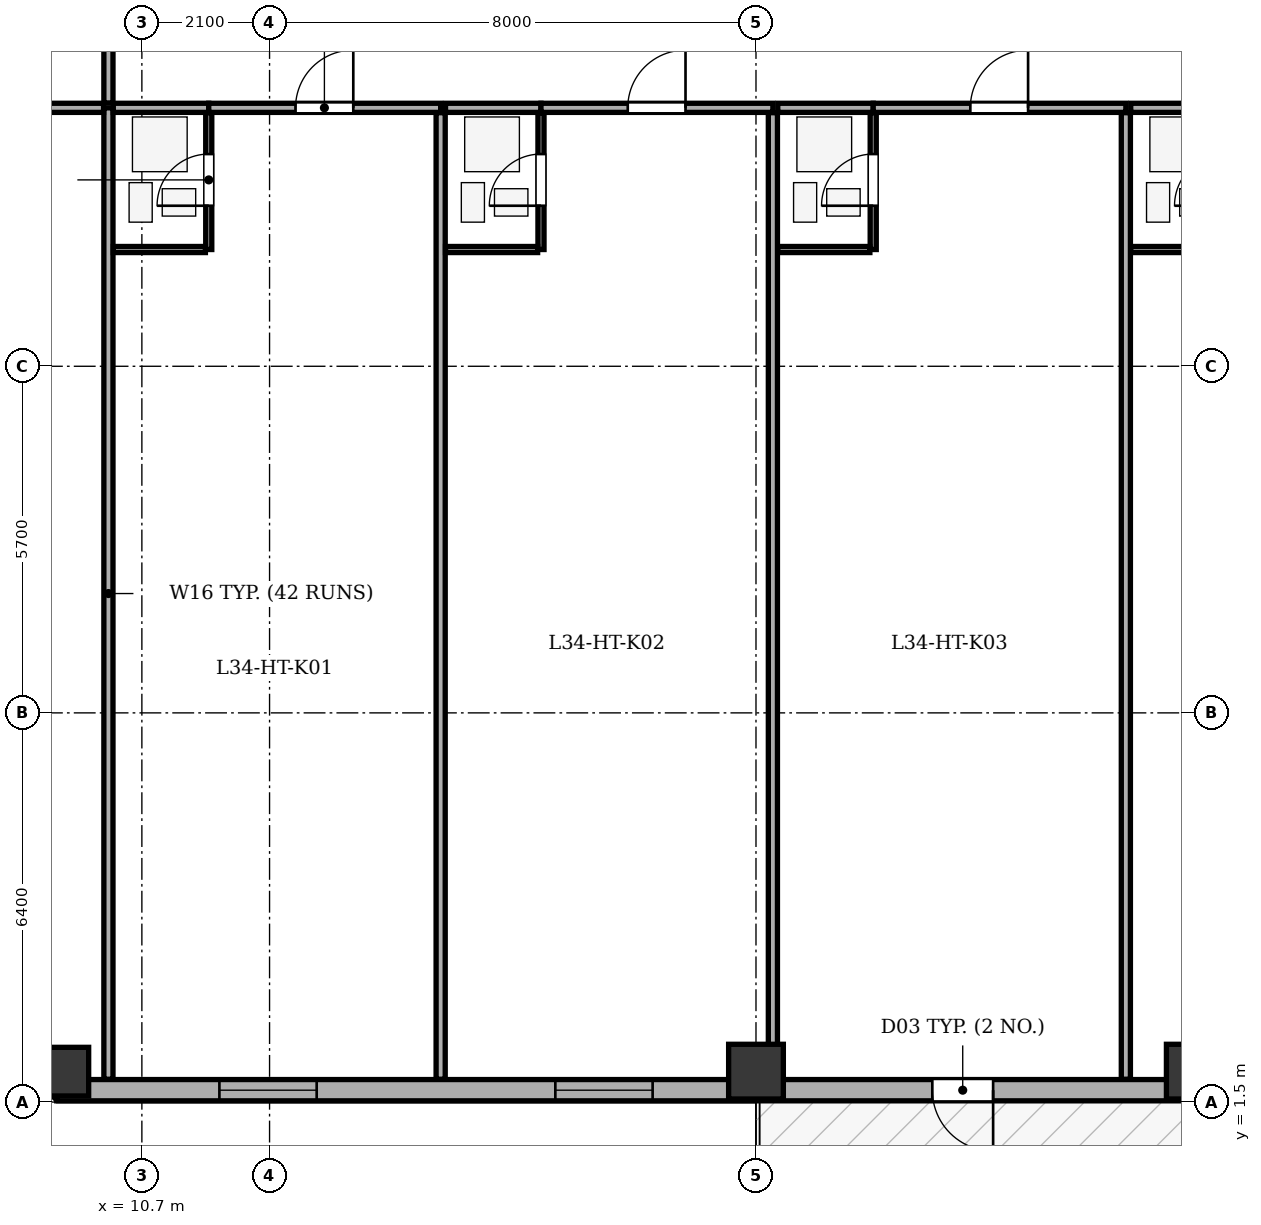
"""IFC4 building model, lengths in metres.
Left out: names, types, materials, properties, quantities, classifications, styles, units other than length and angle.
Written with IfcOpenShell. Run it as: python <this file> out.ifc"""

import sys

from ifc_helpers import new_model, si_unit, direction, frame, frame_2d, origin, origin_2d, place, context, subcontext, project, spatial, rectangle, extrude, element, fill, save


model = new_model("IFC4")
c1 = context("Model", 3, precision=1e-05, world=origin(), true_north=direction((0.0, 1.0)))
c2 = subcontext(c1, "Body", "Model", "MODEL_VIEW")
j1 = project(units=[si_unit("LENGTHUNIT", "METRE"), si_unit("PLANEANGLEUNIT", "RADIAN")], contexts=[c1])
p1 = place(None, origin())
s1 = spatial("IfcSite", under=j1, at=p1, CompositionType="ELEMENT")
p2 = place(p1, origin())
s2 = spatial("IfcBuilding", under=s1, at=p2, CompositionType="ELEMENT")
p3 = place(p2, frame((0.0, 0.0, 137.8)))
s3 = spatial("IfcBuildingStorey", under=s2, at=p3, CompositionType="ELEMENT", Elevation=137.8)
p4 = place(p3, frame((9.3, 2.0, 0.0), z_axis=(0.0, 0.0, 1.0), x_axis=(1.0, 0.0, 0.0)))
e1 = element("IfcColumn", 1, at=p4, inside=s3, PredefinedType="COLUMN", context=c2, shape_type="SweptSolid", body=[
    extrude(rectangle(XDim=0.8, YDim=1.05, at=origin_2d()), origin(), (0.0, 0.0, 1.0), 3.5),
])
for number, where, z_axis, x_axis in (
    (2, (20.8, 2.0, 0.0), (0.0, 0.0, 1.0), (1.0, 0.0, 0.0)),
    (3, (28.0, 2.0, 0.0), (0.0, 0.0, 1.0), (1.0, 0.0, 0.0)),
):
    element("IfcColumn", number, at=place(p3, frame(where, z_axis=z_axis, x_axis=x_axis)), inside=s3, PredefinedType="COLUMN", context=c2, shape_type="SweptSolid", body=[
        extrude(rectangle(XDim=0.9, YDim=0.9, at=origin_2d()), origin(), (0.0, 0.0, 1.0), 3.5),
    ])
p5 = place(p3, frame((44.3, 1.695, 0.0), z_axis=(0.0, 0.0, 1.0), x_axis=(-1.0, 0.0, 0.0)))
e4 = element("IfcWall", 4, at=p5, inside=s3, PredefinedType="STANDARD", context=c2, shape_type="SweptSolid", body=[
    extrude(rectangle(XDim=35.0, YDim=0.35, at=frame_2d((17.5, 0.0))), origin(), (0.0, 0.0, 1.0), 2.435),
])
p6 = place(p5, frame((19.6, 0.0, 0.0)))
e5 = element("IfcOpeningElement", 5, at=p6, cuts=e4, PredefinedType="OPENING", context=c2, shape_type="SweptSolid", body=[
    extrude(rectangle(XDim=1.0, YDim=2.02, at=frame_2d((0.5, 1.01))), frame((0.0, 0.185, 0.0), z_axis=(0.0, -1.0, 0.0), x_axis=(1.0, 0.0, 0.0)), (0.0, 0.0, 1.0), 0.37),
])
p7 = place(p5, frame((2.24, 0.0, 0.75)))
e6 = element("IfcOpeningElement", 6, at=p7, cuts=e4, PredefinedType="OPENING", context=c2, shape_type="SweptSolid", body=[
    extrude(rectangle(XDim=1.6, YDim=1.565, at=frame_2d((0.8, 0.782))), frame((0.0, 0.185, 0.0), z_axis=(0.0, -1.0, 0.0), x_axis=(1.0, 0.0, 0.0)), (0.0, 0.0, 1.0), 0.37),
])
p8 = place(p5, frame((6.678, 0.0, 0.75)))
e7 = element("IfcOpeningElement", 7, at=p8, cuts=e4, PredefinedType="OPENING", context=c2, shape_type="SweptSolid", body=[
    extrude(rectangle(XDim=1.35, YDim=1.565, at=frame_2d((0.675, 0.782))), frame((0.0, 0.185, 0.0), z_axis=(0.0, -1.0, 0.0), x_axis=(1.0, 0.0, 0.0)), (0.0, 0.0, 1.0), 0.37),
])
p9 = place(p5, frame((13.055, 0.0, 0.75)))
e8 = element("IfcOpeningElement", 8, at=p9, cuts=e4, PredefinedType="OPENING", context=c2, shape_type="SweptSolid", body=[
    extrude(rectangle(XDim=1.6, YDim=1.565, at=frame_2d((0.8, 0.782))), frame((0.0, 0.185, 0.0), z_axis=(0.0, -1.0, 0.0), x_axis=(1.0, 0.0, 0.0)), (0.0, 0.0, 1.0), 0.37),
])
p10 = place(p5, frame((25.2, 0.0, 0.75)))
e9 = element("IfcOpeningElement", 9, at=p10, cuts=e4, PredefinedType="OPENING", context=c2, shape_type="SweptSolid", body=[
    extrude(rectangle(XDim=1.6, YDim=1.565, at=frame_2d((0.8, 0.782))), frame((0.0, 0.185, 0.0), z_axis=(0.0, -1.0, 0.0), x_axis=(1.0, 0.0, 0.0)), (0.0, 0.0, 1.0), 0.37),
])
p11 = place(p5, frame((30.725, 0.0, 0.75)))
e10 = element("IfcOpeningElement", 10, at=p11, cuts=e4, PredefinedType="OPENING", context=c2, shape_type="SweptSolid", body=[
    extrude(rectangle(XDim=1.6, YDim=1.565, at=frame_2d((0.8, 0.782))), frame((0.0, 0.185, 0.0), z_axis=(0.0, -1.0, 0.0), x_axis=(1.0, 0.0, 0.0)), (0.0, 0.0, 1.0), 0.37),
])
p12 = place(p3, frame((9.3, 1.695, 0.0), z_axis=(0.0, 0.0, 1.0), x_axis=(-0.707106781187, 0.707106781187, 0.0)))
e11 = element("IfcWall", 11, at=p12, inside=s3, PredefinedType="STANDARD", context=c2, shape_type="SweptSolid", body=[
    extrude(rectangle(XDim=6.795, YDim=0.35, at=frame_2d((3.397, 0.0))), origin(), (0.0, 0.0, 1.0), 2.435),
])
p13 = place(p12, frame((2.698, 0.0, 0.75)))
e12 = element("IfcOpeningElement", 12, at=p13, cuts=e11, PredefinedType="OPENING", context=c2, shape_type="SweptSolid", body=[
    extrude(rectangle(XDim=1.4, YDim=1.565, at=frame_2d((0.7, 0.782))), frame((0.0, 0.185, 0.0), z_axis=(0.0, -1.0, 0.0), x_axis=(1.0, 0.0, 0.0)), (0.0, 0.0, 1.0), 0.37),
])
p14 = place(p3, frame((10.15, 1.875, 0.0), z_axis=(0.0, 0.0, 1.0), x_axis=(0.0, 1.0, 0.0)))
e13 = element("IfcWall", 13, at=p14, inside=s3, PredefinedType="PARTITIONING", context=c2, shape_type="SweptSolid", body=[
    extrude(rectangle(XDim=15.975, YDim=0.15, at=frame_2d((7.988, 0.0))), origin(), (0.0, 0.0, 1.0), 3.05),
])
p15 = place(p3, frame((10.23, 17.85, 0.0), z_axis=(0.0, 0.0, 1.0), x_axis=(1.0, 0.0, 0.0)))
e14 = element("IfcWall", 14, at=p15, inside=s3, PredefinedType="PARTITIONING", context=c2, shape_type="SweptSolid", body=[
    extrude(rectangle(XDim=1.57, YDim=0.15, at=frame_2d((0.785, 0.0))), origin(), (0.0, 0.0, 1.0), 3.05),
])
p16 = place(p3, frame((11.8, 17.85, 0.0), z_axis=(0.0, 0.0, 1.0), x_axis=(1.0, 0.0, 0.0)))
e15 = element("IfcWall", 15, at=p16, inside=s3, PredefinedType="PARTITIONING", context=c2, shape_type="SweptSolid", body=[
    extrude(rectangle(XDim=3.814, YDim=0.15, at=frame_2d((1.907, 0.0))), origin(), (0.0, 0.0, 1.0), 3.05),
])
p17 = place(p16, frame((1.427, 0.0, 0.0)))
e16 = element("IfcOpeningElement", 16, at=p17, cuts=e15, PredefinedType="OPENING", context=c2, shape_type="SweptSolid", body=[
    extrude(rectangle(XDim=0.95, YDim=2.1, at=frame_2d((0.475, 1.05))), frame((0.0, 0.085, 0.0), z_axis=(0.0, -1.0, 0.0), x_axis=(1.0, 0.0, 0.0)), (0.0, 0.0, 1.0), 0.17),
])
p18 = place(p3, frame((11.8, 15.52, 0.0), z_axis=(0.0, 0.0, 1.0), x_axis=(0.0, 1.0, 0.0)))
e17 = element("IfcWall", 17, at=p18, inside=s3, PredefinedType="PARTITIONING", context=c2, shape_type="SweptSolid", body=[
    extrude(rectangle(XDim=2.25, YDim=0.1, at=frame_2d((1.125, 0.0))), origin(), (0.0, 0.0, 1.0), 3.05),
])
p19 = place(p18, frame((0.72, 0.0, 0.0)))
e18 = element("IfcOpeningElement", 18, at=p19, cuts=e17, PredefinedType="OPENING", context=c2, shape_type="SweptSolid", body=[
    extrude(rectangle(XDim=0.85, YDim=2.05, at=frame_2d((0.425, 1.025))), frame((0.0, 0.06, 0.0), z_axis=(0.0, -1.0, 0.0), x_axis=(1.0, 0.0, 0.0)), (0.0, 0.0, 1.0), 0.12),
])
p20 = place(p3, frame((10.23, 15.52, 0.0), z_axis=(0.0, 0.0, 1.0), x_axis=(1.0, 0.0, 0.0)))
e19 = element("IfcWall", 19, at=p20, inside=s3, PredefinedType="PARTITIONING", context=c2, shape_type="SweptSolid", body=[
    extrude(rectangle(XDim=1.515, YDim=0.1, at=frame_2d((0.758, 0.0))), origin(), (0.0, 0.0, 1.0), 3.05),
])
p21 = place(p3, frame((15.614, 1.875, 0.0), z_axis=(0.0, 0.0, 1.0), x_axis=(0.0, 1.0, 0.0)))
e20 = element("IfcWall", 20, at=p21, inside=s3, PredefinedType="PARTITIONING", context=c2, shape_type="SweptSolid", body=[
    extrude(rectangle(XDim=15.895, YDim=0.15, at=frame_2d((7.948, 0.0))), origin(), (0.0, 0.0, 1.0), 1.635),
])
p22 = place(p3, frame((15.694, 17.85, 0.0), z_axis=(0.0, 0.0, 1.0), x_axis=(1.0, 0.0, 0.0)))
e21 = element("IfcWall", 21, at=p22, inside=s3, PredefinedType="PARTITIONING", context=c2, shape_type="SweptSolid", body=[
    extrude(rectangle(XDim=1.57, YDim=0.15, at=frame_2d((0.785, 0.0))), origin(), (0.0, 0.0, 1.0), 3.05),
])
p23 = place(p3, frame((17.264, 17.85, 0.0), z_axis=(0.0, 0.0, 1.0), x_axis=(1.0, 0.0, 0.0)))
e22 = element("IfcWall", 22, at=p23, inside=s3, PredefinedType="PARTITIONING", context=c2, shape_type="SweptSolid", body=[
    extrude(rectangle(XDim=3.814, YDim=0.15, at=frame_2d((1.907, 0.0))), origin(), (0.0, 0.0, 1.0), 3.05),
])
p24 = place(p23, frame((1.427, 0.0, 0.0)))
e23 = element("IfcOpeningElement", 23, at=p24, cuts=e22, PredefinedType="OPENING", context=c2, shape_type="SweptSolid", body=[
    extrude(rectangle(XDim=0.95, YDim=2.1, at=frame_2d((0.475, 1.05))), frame((0.0, 0.085, 0.0), z_axis=(0.0, -1.0, 0.0), x_axis=(1.0, 0.0, 0.0)), (0.0, 0.0, 1.0), 0.17),
])
p25 = place(p3, frame((17.264, 15.52, 0.0), z_axis=(0.0, 0.0, 1.0), x_axis=(0.0, 1.0, 0.0)))
e24 = element("IfcWall", 24, at=p25, inside=s3, PredefinedType="PARTITIONING", context=c2, shape_type="SweptSolid", body=[
    extrude(rectangle(XDim=2.25, YDim=0.1, at=frame_2d((1.125, 0.0))), origin(), (0.0, 0.0, 1.0), 3.05),
])
p26 = place(p25, frame((0.72, 0.0, 0.0)))
e25 = element("IfcOpeningElement", 25, at=p26, cuts=e24, PredefinedType="OPENING", context=c2, shape_type="SweptSolid", body=[
    extrude(rectangle(XDim=0.85, YDim=2.05, at=frame_2d((0.425, 1.025))), frame((0.0, 0.06, 0.0), z_axis=(0.0, -1.0, 0.0), x_axis=(1.0, 0.0, 0.0)), (0.0, 0.0, 1.0), 0.12),
])
p27 = place(p3, frame((15.694, 15.52, 0.0), z_axis=(0.0, 0.0, 1.0), x_axis=(1.0, 0.0, 0.0)))
e26 = element("IfcWall", 26, at=p27, inside=s3, PredefinedType="PARTITIONING", context=c2, shape_type="SweptSolid", body=[
    extrude(rectangle(XDim=1.515, YDim=0.1, at=frame_2d((0.757, 0.0))), origin(), (0.0, 0.0, 1.0), 3.05),
])
p28 = place(p3, frame((21.078, 1.875, 0.0), z_axis=(0.0, 0.0, 1.0), x_axis=(0.0, 1.0, 0.0)))
e27 = element("IfcWall", 27, at=p28, inside=s3, PredefinedType="PARTITIONING", context=c2, shape_type="SweptSolid", body=[
    extrude(rectangle(XDim=15.895, YDim=0.15, at=frame_2d((7.948, 0.0))), origin(), (0.0, 0.0, 1.0), 3.05),
])
p29 = place(p3, frame((21.158, 17.85, 0.0), z_axis=(0.0, 0.0, 1.0), x_axis=(1.0, 0.0, 0.0)))
e28 = element("IfcWall", 28, at=p29, inside=s3, PredefinedType="PARTITIONING", context=c2, shape_type="SweptSolid", body=[
    extrude(rectangle(XDim=1.57, YDim=0.15, at=frame_2d((0.785, 0.0))), origin(), (0.0, 0.0, 1.0), 3.05),
])
p30 = place(p3, frame((22.728, 17.85, 0.0), z_axis=(0.0, 0.0, 1.0), x_axis=(1.0, 0.0, 0.0)))
e29 = element("IfcWall", 29, at=p30, inside=s3, PredefinedType="PARTITIONING", context=c2, shape_type="SweptSolid", body=[
    extrude(rectangle(XDim=4.155, YDim=0.15, at=frame_2d((2.078, 0.0))), origin(), (0.0, 0.0, 1.0), 3.05),
])
p31 = place(p30, frame((1.597, 0.0, 0.0)))
e30 = element("IfcOpeningElement", 30, at=p31, cuts=e29, PredefinedType="OPENING", context=c2, shape_type="SweptSolid", body=[
    extrude(rectangle(XDim=0.95, YDim=2.1, at=frame_2d((0.475, 1.05))), frame((0.0, 0.085, 0.0), z_axis=(0.0, -1.0, 0.0), x_axis=(1.0, 0.0, 0.0)), (0.0, 0.0, 1.0), 0.17),
])
p32 = place(p3, frame((22.728, 15.52, 0.0), z_axis=(0.0, 0.0, 1.0), x_axis=(0.0, 1.0, 0.0)))
e31 = element("IfcWall", 31, at=p32, inside=s3, PredefinedType="PARTITIONING", context=c2, shape_type="SweptSolid", body=[
    extrude(rectangle(XDim=2.25, YDim=0.1, at=frame_2d((1.125, 0.0))), origin(), (0.0, 0.0, 1.0), 3.05),
])
p33 = place(p32, frame((0.72, 0.0, 0.0)))
e32 = element("IfcOpeningElement", 32, at=p33, cuts=e31, PredefinedType="OPENING", context=c2, shape_type="SweptSolid", body=[
    extrude(rectangle(XDim=0.85, YDim=2.05, at=frame_2d((0.425, 1.025))), frame((0.0, 0.06, 0.0), z_axis=(0.0, -1.0, 0.0), x_axis=(1.0, 0.0, 0.0)), (0.0, 0.0, 1.0), 0.12),
])
p34 = place(p3, frame((21.158, 15.52, 0.0), z_axis=(0.0, 0.0, 1.0), x_axis=(1.0, 0.0, 0.0)))
e33 = element("IfcWall", 33, at=p34, inside=s3, PredefinedType="PARTITIONING", context=c2, shape_type="SweptSolid", body=[
    extrude(rectangle(XDim=1.515, YDim=0.1, at=frame_2d((0.758, 0.0))), origin(), (0.0, 0.0, 1.0), 3.05),
])
p35 = place(p3, frame((26.883, 1.875, 0.0), z_axis=(0.0, 0.0, 1.0), x_axis=(0.0, 1.0, 0.0)))
e34 = element("IfcWall", 34, at=p35, inside=s3, PredefinedType="PARTITIONING", context=c2, shape_type="SweptSolid", body=[
    extrude(rectangle(XDim=15.895, YDim=0.15, at=frame_2d((7.948, 0.0))), origin(), (0.0, 0.0, 1.0), 3.05),
])
p36 = place(p3, frame((26.963, 17.85, 0.0), z_axis=(0.0, 0.0, 1.0), x_axis=(1.0, 0.0, 0.0)))
e35 = element("IfcWall", 35, at=p36, inside=s3, PredefinedType="PARTITIONING", context=c2, shape_type="SweptSolid", body=[
    extrude(rectangle(XDim=1.57, YDim=0.15, at=frame_2d((0.785, 0.0))), origin(), (0.0, 0.0, 1.0), 3.05),
])
p37 = place(p3, frame((26.963, 15.52, 0.0), z_axis=(0.0, 0.0, 1.0), x_axis=(1.0, 0.0, 0.0)))
e36 = element("IfcWall", 36, at=p37, inside=s3, PredefinedType="PARTITIONING", context=c2, shape_type="SweptSolid", body=[
    extrude(rectangle(XDim=1.515, YDim=0.1, at=frame_2d((0.758, 0.0))), origin(), (0.0, 0.0, 1.0), 3.05),
])
p38 = place(p3, frame((4.675, 17.85, 0.0), z_axis=(0.0, 0.0, 1.0), x_axis=(1.0, 0.0, 0.0)))
e37 = element("IfcWall", 37, at=p38, inside=s3, PredefinedType="PARTITIONING", context=c2, shape_type="SweptSolid", body=[
    extrude(rectangle(XDim=5.395, YDim=0.15, at=frame_2d((2.698, 0.0))), origin(), (0.0, 0.0, 1.0), 3.05),
])
p39 = place(p3, frame((10.15, 17.93, 0.0), z_axis=(0.0, 0.0, 1.0), x_axis=(0.0, 1.0, 0.0)))
e38 = element("IfcWall", 38, at=p39, inside=s3, PredefinedType="PARTITIONING", context=c2, shape_type="SweptSolid", body=[
    extrude(rectangle(XDim=9.27, YDim=0.15, at=frame_2d((4.635, 0.0))), origin(), (0.0, 0.0, 1.0), 3.05),
])
p40 = place(p39, frame((4.115, 0.0, 0.0)))
e39 = element("IfcOpeningElement", 39, at=p40, cuts=e38, PredefinedType="OPENING", context=c2, shape_type="SweptSolid", body=[
    extrude(rectangle(XDim=0.95, YDim=2.1, at=frame_2d((0.475, 1.05))), frame((0.0, 0.085, 0.0), z_axis=(0.0, -1.0, 0.0), x_axis=(1.0, 0.0, 0.0)), (0.0, 0.0, 1.0), 0.17),
])
p41 = place(p6, origin())
e40 = element("IfcDoor", 40, at=p41, inside=s3, OperationType="SINGLE_SWING_LEFT", PredefinedType="DOOR", context=c2, shape_type="SweptSolid", body=[
    extrude(rectangle(XDim=1.0, YDim=2.02, at=frame_2d((0.5, 1.01))), frame((0.0, 0.025, 0.0), z_axis=(0.0, -1.0, 0.0), x_axis=(1.0, 0.0, 0.0)), (0.0, 0.0, 1.0), 0.05),
])
fill(e5, e40)
p42 = place(p10, origin())
e41 = element("IfcWindow", 41, at=p42, inside=s3, PartitioningType="SINGLE_PANEL", PredefinedType="WINDOW", context=c2, shape_type="SweptSolid", body=[
    extrude(rectangle(XDim=1.6, YDim=1.565, at=frame_2d((0.8, 0.782))), frame((0.0, -0.01, 0.0), z_axis=(0.0, -1.0, 0.0), x_axis=(1.0, 0.0, 0.0)), (0.0, 0.0, 1.0), 0.06),
])
fill(e9, e41)
p43 = place(p11, origin())
e42 = element("IfcWindow", 42, at=p43, inside=s3, PartitioningType="SINGLE_PANEL", PredefinedType="WINDOW", context=c2, shape_type="SweptSolid", body=[
    extrude(rectangle(XDim=1.6, YDim=1.565, at=frame_2d((0.8, 0.782))), frame((0.0, -0.01, 0.0), z_axis=(0.0, -1.0, 0.0), x_axis=(1.0, 0.0, 0.0)), (0.0, 0.0, 1.0), 0.06),
])
fill(e10, e42)
p44 = place(p19, origin())
e43 = element("IfcDoor", 43, at=p44, inside=s3, OperationType="SINGLE_SWING_LEFT", PredefinedType="DOOR", context=c2, shape_type="SweptSolid", body=[
    extrude(rectangle(XDim=0.85, YDim=2.05, at=frame_2d((0.425, 1.025))), frame((0.0, 0.025, 0.0), z_axis=(0.0, -1.0, 0.0), x_axis=(1.0, 0.0, 0.0)), (0.0, 0.0, 1.0), 0.05),
])
fill(e18, e43)
p45 = place(p17, origin())
e44 = element("IfcDoor", 44, at=p45, inside=s3, OperationType="SINGLE_SWING_RIGHT", PredefinedType="DOOR", context=c2, shape_type="SweptSolid", body=[
    extrude(rectangle(XDim=0.95, YDim=2.1, at=frame_2d((0.475, 1.05))), frame((0.0, 0.025, 0.0), z_axis=(0.0, -1.0, 0.0), x_axis=(1.0, 0.0, 0.0)), (0.0, 0.0, 1.0), 0.05),
])
fill(e16, e44)
p46 = place(p26, origin())
e45 = element("IfcDoor", 45, at=p46, inside=s3, OperationType="SINGLE_SWING_LEFT", PredefinedType="DOOR", context=c2, shape_type="SweptSolid", body=[
    extrude(rectangle(XDim=0.85, YDim=2.05, at=frame_2d((0.425, 1.025))), frame((0.0, 0.025, 0.0), z_axis=(0.0, -1.0, 0.0), x_axis=(1.0, 0.0, 0.0)), (0.0, 0.0, 1.0), 0.05),
])
fill(e25, e45)
p47 = place(p24, origin())
e46 = element("IfcDoor", 46, at=p47, inside=s3, OperationType="SINGLE_SWING_RIGHT", PredefinedType="DOOR", context=c2, shape_type="SweptSolid", body=[
    extrude(rectangle(XDim=0.95, YDim=2.1, at=frame_2d((0.475, 1.05))), frame((0.0, 0.025, 0.0), z_axis=(0.0, -1.0, 0.0), x_axis=(1.0, 0.0, 0.0)), (0.0, 0.0, 1.0), 0.05),
])
fill(e23, e46)
p48 = place(p33, origin())
e47 = element("IfcDoor", 47, at=p48, inside=s3, OperationType="SINGLE_SWING_LEFT", PredefinedType="DOOR", context=c2, shape_type="SweptSolid", body=[
    extrude(rectangle(XDim=0.85, YDim=2.05, at=frame_2d((0.425, 1.025))), frame((0.0, 0.025, 0.0), z_axis=(0.0, -1.0, 0.0), x_axis=(1.0, 0.0, 0.0)), (0.0, 0.0, 1.0), 0.05),
])
fill(e32, e47)
p49 = place(p31, origin())
e48 = element("IfcDoor", 48, at=p49, inside=s3, OperationType="SINGLE_SWING_RIGHT", PredefinedType="DOOR", context=c2, shape_type="SweptSolid", body=[
    extrude(rectangle(XDim=0.95, YDim=2.1, at=frame_2d((0.475, 1.05))), frame((0.0, 0.025, 0.0), z_axis=(0.0, -1.0, 0.0), x_axis=(1.0, 0.0, 0.0)), (0.0, 0.0, 1.0), 0.05),
])
fill(e30, e48)
save(model, sys.argv[1])
